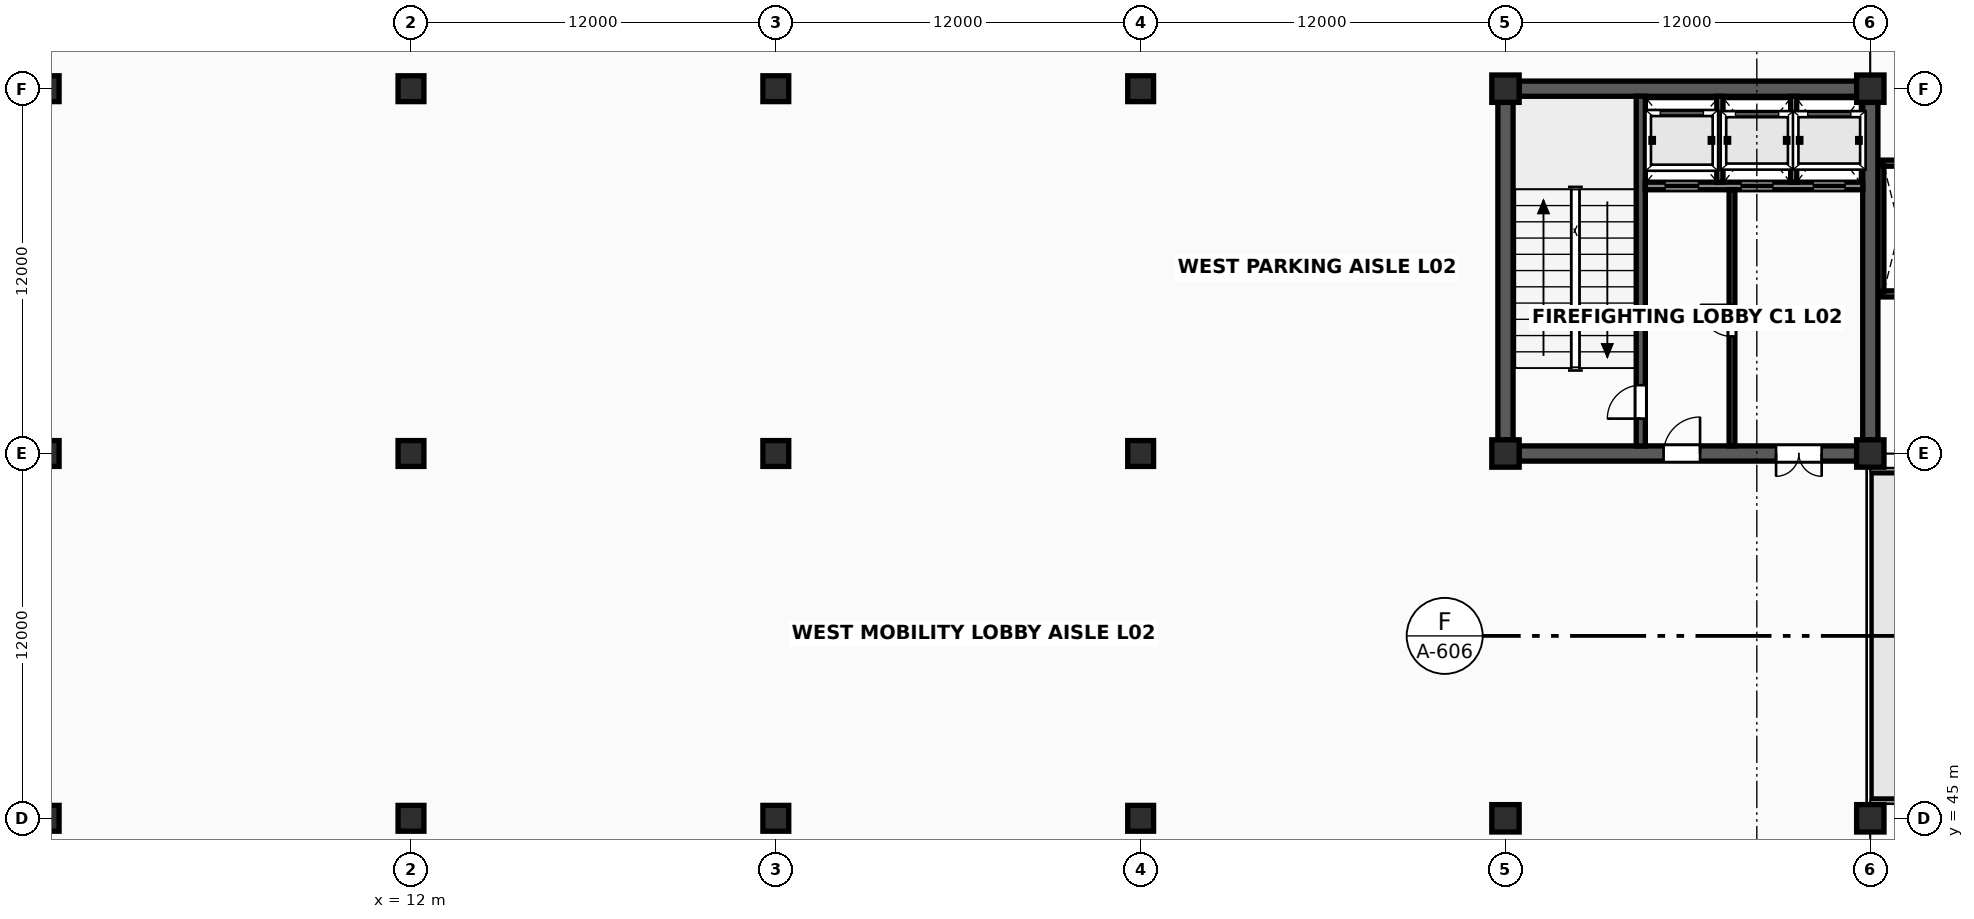
"""IFC4 building model, lengths in metres.
Left out: names, types, materials, properties, quantities, classifications, styles, units other than length and angle.
Written with IfcOpenShell. Run it as: python <this file> out.ifc"""

import sys

from ifc_helpers import new_model, si_unit, direction, frame, frame_2d, origin, origin_2d, place, context, subcontext, project, spatial, rectangle, extrude, element, fill, save


model = new_model("IFC4")
c1 = context("Model", 3, precision=1e-05, world=origin(), true_north=direction((0.0, 1.0)))
c2 = subcontext(c1, "Body", "Model", "MODEL_VIEW")
j1 = project(units=[si_unit("LENGTHUNIT", "METRE"), si_unit("PLANEANGLEUNIT", "RADIAN")], contexts=[c1])
p1 = place(None, origin())
s1 = spatial("IfcSite", under=j1, at=p1, CompositionType="ELEMENT")
p2 = place(p1, origin())
s2 = spatial("IfcBuilding", under=s1, at=p2, CompositionType="ELEMENT")
p3 = place(p2, frame((0.0, 0.0, 9.6)))
s3 = spatial("IfcBuildingStorey", under=s2, at=p3, CompositionType="ELEMENT", Elevation=9.6)
for number, where, z_axis, x_axis in (
    (1, (0.0, 45.0, 0.0), (0.0, 0.0, 1.0), (1.0, 0.0, 0.0)),
    (2, (0.0, 57.0, 0.0), (0.0, 0.0, 1.0), (1.0, 0.0, 0.0)),
    (3, (0.0, 69.0, 0.0), (0.0, 0.0, 1.0), (1.0, 0.0, 0.0)),
    (4, (12.0, 45.0, 0.0), (0.0, 0.0, 1.0), (1.0, 0.0, 0.0)),
    (5, (12.0, 57.0, 0.0), (0.0, 0.0, 1.0), (1.0, 0.0, 0.0)),
    (6, (12.0, 69.0, 0.0), (0.0, 0.0, 1.0), (1.0, 0.0, 0.0)),
    (7, (24.0, 45.0, 0.0), (0.0, 0.0, 1.0), (1.0, 0.0, 0.0)),
    (8, (24.0, 57.0, 0.0), (0.0, 0.0, 1.0), (1.0, 0.0, 0.0)),
    (9, (24.0, 69.0, 0.0), (0.0, 0.0, 1.0), (1.0, 0.0, 0.0)),
    (10, (36.0, 45.0, 0.0), (0.0, 0.0, 1.0), (1.0, 0.0, 0.0)),
    (11, (36.0, 57.0, 0.0), (0.0, 0.0, 1.0), (1.0, 0.0, 0.0)),
    (12, (36.0, 69.0, 0.0), (0.0, 0.0, 1.0), (1.0, 0.0, 0.0)),
):
    element("IfcColumn", number, at=place(p3, frame(where, z_axis=z_axis, x_axis=x_axis)), inside=s3, PredefinedType="COLUMN", context=c2, shape_type="SweptSolid", body=[
        extrude(rectangle(XDim=0.85, YDim=0.85, at=origin_2d()), origin(), (0.0, 0.0, 1.0), 3.8),
    ])
for number, where, z_axis, x_axis in (
    (13, (48.0, 45.0, 0.0), (0.0, 0.0, 1.0), (1.0, 0.0, 0.0)),
    (14, (48.0, 57.0, 0.0), (0.0, 0.0, 1.0), (1.0, 0.0, 0.0)),
    (15, (48.0, 69.0, 0.0), (0.0, 0.0, 1.0), (1.0, 0.0, 0.0)),
    (16, (60.0, 45.0, 0.0), (0.0, 0.0, 1.0), (1.0, 0.0, 0.0)),
    (17, (60.0, 57.0, 0.0), (0.0, 0.0, 1.0), (1.0, 0.0, 0.0)),
    (18, (60.0, 69.0, 0.0), (0.0, 0.0, 1.0), (1.0, 0.0, 0.0)),
):
    element("IfcColumn", number, at=place(p3, frame(where, z_axis=z_axis, x_axis=x_axis)), inside=s3, PredefinedType="COLUMN", context=c2, shape_type="SweptSolid", body=[
        extrude(rectangle(XDim=0.9, YDim=0.9, at=origin_2d()), origin(), (0.0, 0.0, 1.0), 3.8),
    ])
for number, where, z_axis, x_axis in (
    (19, (60.347, 62.25, 0.0), (0.0, 0.0, 1.0), (1.0, 0.0, 0.0)),
    (20, (60.347, 66.55, 0.0), (0.0, 0.0, 1.0), (1.0, 0.0, 0.0)),
):
    element("IfcWall", number, at=place(p3, frame(where, z_axis=z_axis, x_axis=x_axis)), inside=s3, PredefinedType="SOLIDWALL", context=c2, shape_type="SweptSolid", body=[
        extrude(rectangle(XDim=1.233, YDim=0.2, at=frame_2d((0.617, 0.0))), origin(), (0.0, 0.0, 1.0), 3.638),
    ])
p4 = place(p3, frame((60.347, 62.33, 0.0), z_axis=(0.0, 0.0, 1.0), x_axis=(0.0, 1.0, 0.0)))
e21 = element("IfcWall", 21, at=p4, inside=s3, PredefinedType="SOLIDWALL", context=c2, shape_type="SweptSolid", body=[
    extrude(rectangle(XDim=4.14, YDim=0.2, at=frame_2d((2.07, 0.0))), origin(), (0.0, 0.0, 1.0), 3.638),
])
p5 = place(p3, frame((48.447, 57.0, 0.0), z_axis=(0.0, 0.0, 1.0), x_axis=(1.0, 0.0, 0.0)))
e22 = element("IfcWall", 22, at=p5, inside=s3, PredefinedType="SHEAR", context=c2, shape_type="SweptSolid", body=[
    extrude(rectangle(XDim=11.106, YDim=0.5, at=frame_2d((5.553, 0.0))), origin(), (0.0, 0.0, 1.0), 3.638),
])
p6 = place(p5, frame((4.753, 0.0, 0.0)))
e23 = element("IfcOpeningElement", 23, at=p6, cuts=e22, PredefinedType="OPENING", context=c2, shape_type="SweptSolid", body=[
    extrude(rectangle(XDim=1.2, YDim=2.2, at=frame_2d((0.6, 1.1))), frame((0.0, 0.265, 0.0), z_axis=(0.0, -1.0, 0.0), x_axis=(1.0, 0.0, 0.0)), (0.0, 0.0, 1.0), 0.53),
])
p7 = place(p5, frame((8.453, 0.0, 0.0)))
e24 = element("IfcOpeningElement", 24, at=p7, cuts=e22, PredefinedType="OPENING", context=c2, shape_type="SweptSolid", body=[
    extrude(rectangle(XDim=1.5, YDim=2.25, at=frame_2d((0.75, 1.125))), frame((0.0, 0.265, 0.0), z_axis=(0.0, -1.0, 0.0), x_axis=(1.0, 0.0, 0.0)), (0.0, 0.0, 1.0), 0.53),
])
for number, where, z_axis, x_axis in (
    (25, (48.447, 69.0, 0.0), (0.0, 0.0, 1.0), (1.0, 0.0, 0.0)),
    (26, (48.0, 57.447, 0.0), (0.0, 0.0, 1.0), (0.0, 1.0, 0.0)),
    (27, (60.0, 57.447, 0.0), (0.0, 0.0, 1.0), (0.0, 1.0, 0.0)),
):
    element("IfcWall", number, at=place(p3, frame(where, z_axis=z_axis, x_axis=x_axis)), inside=s3, PredefinedType="SHEAR", context=c2, shape_type="SweptSolid", body=[
        extrude(rectangle(XDim=11.106, YDim=0.5, at=frame_2d((5.553, 0.0))), origin(), (0.0, 0.0, 1.0), 3.638),
    ])
p8 = place(p3, frame((52.45, 57.247, 0.0), z_axis=(0.0, 0.0, 1.0), x_axis=(0.0, 1.0, 0.0)))
e28 = element("IfcWall", 28, at=p8, inside=s3, PredefinedType="SHEAR", context=c2, shape_type="SweptSolid", body=[
    extrude(rectangle(XDim=11.506, YDim=0.3, at=frame_2d((5.753, 0.0))), origin(), (0.0, 0.0, 1.0), 3.638),
])
p9 = place(p8, frame((0.9, 0.0, 0.0)))
e29 = element("IfcOpeningElement", 29, at=p9, cuts=e28, PredefinedType="OPENING", context=c2, shape_type="SweptSolid", body=[
    extrude(rectangle(XDim=1.1, YDim=2.2, at=frame_2d((0.55, 1.1))), frame((0.0, 0.165, 0.0), z_axis=(0.0, -1.0, 0.0), x_axis=(1.0, 0.0, 0.0)), (0.0, 0.0, 1.0), 0.33),
])
p10 = place(p3, frame((52.597, 65.8, 0.0), z_axis=(0.0, 0.0, 1.0), x_axis=(1.0, 0.0, 0.0)))
e30 = element("IfcWall", 30, at=p10, inside=s3, PredefinedType="SOLIDWALL", context=c2, shape_type="SweptSolid", body=[
    extrude(rectangle(XDim=7.156, YDim=0.25, at=frame_2d((3.578, 0.0))), origin(), (0.0, 0.0, 1.0), 3.638),
])
p11 = place(p10, frame((0.653, 0.0, 0.0)))
e31 = element("IfcOpeningElement", 31, at=p11, cuts=e30, PredefinedType="OPENING", context=c2, shape_type="SweptSolid", body=[
    extrude(rectangle(XDim=1.1, YDim=2.24, at=frame_2d((0.55, 1.12))), frame((0.0, 0.14, 0.0), z_axis=(0.0, -1.0, 0.0), x_axis=(1.0, 0.0, 0.0)), (0.0, 0.0, 1.0), 0.28),
])
p12 = place(p10, frame((3.153, 0.0, 0.0)))
e32 = element("IfcOpeningElement", 32, at=p12, cuts=e30, PredefinedType="OPENING", context=c2, shape_type="SweptSolid", body=[
    extrude(rectangle(XDim=1.05, YDim=2.2, at=frame_2d((0.525, 1.1))), frame((0.0, 0.14, 0.0), z_axis=(0.0, -1.0, 0.0), x_axis=(1.0, 0.0, 0.0)), (0.0, 0.0, 1.0), 0.28),
])
p13 = place(p10, frame((5.528, 0.0, 0.0)))
e33 = element("IfcOpeningElement", 33, at=p13, cuts=e30, PredefinedType="OPENING", context=c2, shape_type="SweptSolid", body=[
    extrude(rectangle(XDim=1.05, YDim=2.2, at=frame_2d((0.525, 1.1))), frame((0.0, 0.14, 0.0), z_axis=(0.0, -1.0, 0.0), x_axis=(1.0, 0.0, 0.0)), (0.0, 0.0, 1.0), 0.28),
])
for number, where, z_axis, x_axis in (
    (34, (55.05, 65.92, 0.0), (0.0, 0.0, 1.0), (0.0, 1.0, 0.0)),
    (35, (57.48, 65.92, 0.0), (0.0, 0.0, 1.0), (0.0, 1.0, 0.0)),
):
    element("IfcWall", number, at=place(p3, frame(where, z_axis=z_axis, x_axis=x_axis)), inside=s3, PredefinedType="SOLIDWALL", context=c2, shape_type="SweptSolid", body=[
        extrude(rectangle(XDim=2.83, YDim=0.2, at=frame_2d((1.415, 0.0))), origin(), (0.0, 0.0, 1.0), 3.628),
    ])
p14 = place(p3, frame((55.45, 57.25, 0.0), z_axis=(0.0, 0.0, 1.0), x_axis=(0.0, 1.0, 0.0)))
e36 = element("IfcWall", 36, at=p14, inside=s3, PredefinedType="SOLIDWALL", context=c2, shape_type="SweptSolid", body=[
    extrude(rectangle(XDim=8.43, YDim=0.19, at=frame_2d((4.215, 0.0))), origin(), (0.0, 0.0, 1.0), 3.628),
])
p15 = place(p14, frame((3.6, 0.0, 0.0)))
e37 = element("IfcOpeningElement", 37, at=p15, cuts=e36, PredefinedType="OPENING", context=c2, shape_type="SweptSolid", body=[
    extrude(rectangle(XDim=1.04, YDim=2.18, at=frame_2d((0.52, 1.09))), frame((0.0, 0.11, 0.0), z_axis=(0.0, -1.0, 0.0), x_axis=(1.0, 0.0, 0.0)), (0.0, 0.0, 1.0), 0.22),
])
p16 = place(p9, origin())
e38 = element("IfcDoor", 38, at=p16, inside=s3, OperationType="SINGLE_SWING_LEFT", PredefinedType="DOOR", context=c2, shape_type="SweptSolid", body=[
    extrude(rectangle(XDim=1.1, YDim=2.2, at=frame_2d((0.55, 1.1))), frame((0.0, 0.025, 0.0), z_axis=(0.0, -1.0, 0.0), x_axis=(1.0, 0.0, 0.0)), (0.0, 0.0, 1.0), 0.05),
])
fill(e29, e38)
p17 = place(p15, origin())
e39 = element("IfcDoor", 39, at=p17, inside=s3, OperationType="SINGLE_SWING_RIGHT", PredefinedType="DOOR", context=c2, shape_type="SweptSolid", body=[
    extrude(rectangle(XDim=1.04, YDim=2.18, at=frame_2d((0.52, 1.09))), frame((0.0, 0.025, 0.0), z_axis=(0.0, -1.0, 0.0), x_axis=(1.0, 0.0, 0.0)), (0.0, 0.0, 1.0), 0.05),
])
fill(e37, e39)
p18 = place(p6, origin())
e40 = element("IfcDoor", 40, at=p18, inside=s3, OperationType="SINGLE_SWING_RIGHT", PredefinedType="DOOR", context=c2, shape_type="SweptSolid", body=[
    extrude(rectangle(XDim=1.2, YDim=2.2, at=frame_2d((0.6, 1.1))), frame((0.0, 0.025, 0.0), z_axis=(0.0, -1.0, 0.0), x_axis=(1.0, 0.0, 0.0)), (0.0, 0.0, 1.0), 0.05),
])
fill(e23, e40)
p19 = place(p7, origin())
e41 = element("IfcDoor", 41, at=p19, inside=s3, OperationType="DOUBLE_DOOR_SINGLE_SWING", PredefinedType="DOOR", context=c2, shape_type="SweptSolid", body=[
    extrude(rectangle(XDim=1.5, YDim=2.25, at=frame_2d((0.75, 1.125))), frame((0.0, 0.025, 0.0), z_axis=(0.0, -1.0, 0.0), x_axis=(1.0, 0.0, 0.0)), (0.0, 0.0, 1.0), 0.05),
])
fill(e24, e41)
p20 = place(p11, origin())
e42 = element("IfcDoor", 42, at=p20, inside=s3, OperationType="SLIDING_TO_LEFT", PredefinedType="USERDEFINED", context=c2, shape_type="SweptSolid", body=[
    extrude(rectangle(XDim=1.1, YDim=2.24, at=frame_2d((0.55, 1.12))), frame((0.0, 0.025, 0.0), z_axis=(0.0, -1.0, 0.0), x_axis=(1.0, 0.0, 0.0)), (0.0, 0.0, 1.0), 0.05),
])
fill(e31, e42)
p21 = place(p12, origin())
e43 = element("IfcDoor", 43, at=p21, inside=s3, OperationType="SLIDING_TO_LEFT", PredefinedType="USERDEFINED", context=c2, shape_type="SweptSolid", body=[
    extrude(rectangle(XDim=1.05, YDim=2.2, at=frame_2d((0.525, 1.1))), frame((0.0, 0.025, 0.0), z_axis=(0.0, -1.0, 0.0), x_axis=(1.0, 0.0, 0.0)), (0.0, 0.0, 1.0), 0.05),
])
fill(e32, e43)
p22 = place(p13, origin())
e44 = element("IfcDoor", 44, at=p22, inside=s3, OperationType="SLIDING_TO_LEFT", PredefinedType="USERDEFINED", context=c2, shape_type="SweptSolid", body=[
    extrude(rectangle(XDim=1.05, YDim=2.2, at=frame_2d((0.525, 1.1))), frame((0.0, 0.025, 0.0), z_axis=(0.0, -1.0, 0.0), x_axis=(1.0, 0.0, 0.0)), (0.0, 0.0, 1.0), 0.05),
])
fill(e33, e44)
save(model, sys.argv[1])
